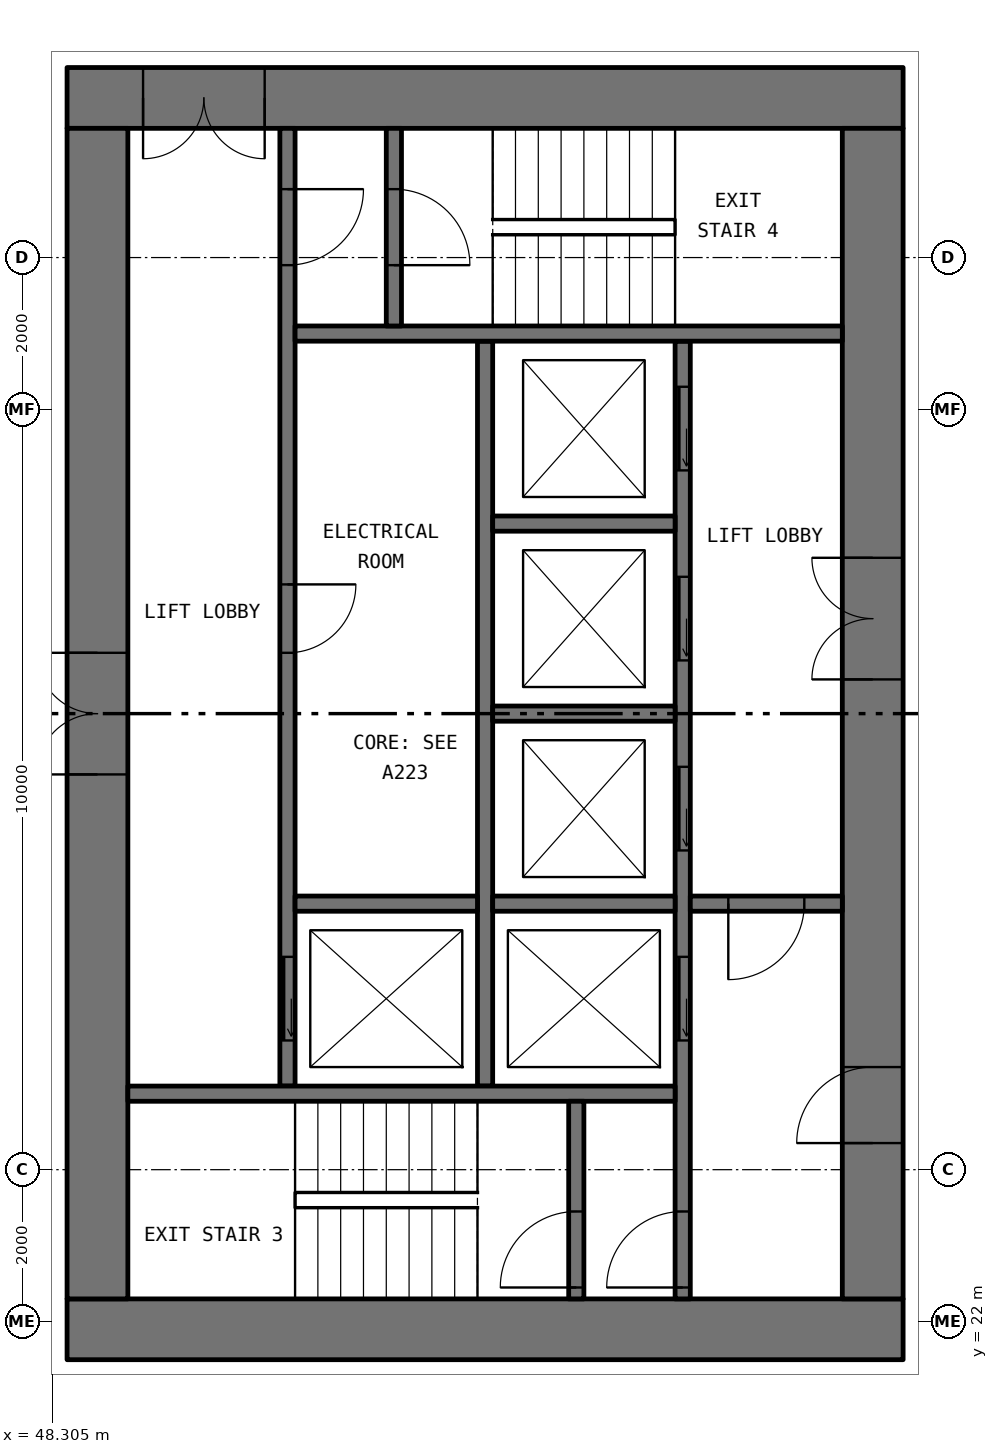
"""IFC4 building model, lengths in metres.
Left out: names, types, materials, properties, quantities, classifications, styles, units other than length and angle.
Written with IfcOpenShell. Run it as: python <this file> out.ifc"""

import sys

from ifc_helpers import new_model, si_unit, direction, frame, frame_2d, origin, place, context, subcontext, project, spatial, rectangle, extrude, element, fill, save


model = new_model("IFC4")
c1 = context("Model", 3, precision=1e-05, world=origin(), true_north=direction((0.0, 1.0)))
c2 = subcontext(c1, "Body", "Model", "MODEL_VIEW")
j1 = project(units=[si_unit("LENGTHUNIT", "METRE"), si_unit("PLANEANGLEUNIT", "RADIAN")], contexts=[c1])
p1 = place(None, origin())
s1 = spatial("IfcSite", under=j1, at=p1, CompositionType="ELEMENT")
p2 = place(p1, origin())
s2 = spatial("IfcBuilding", under=s1, at=p2, CompositionType="ELEMENT")
p3 = place(p2, frame((0.0, 0.0, 88.65)))
s3 = spatial("IfcBuildingStorey", under=s2, at=p3, CompositionType="ELEMENT", Elevation=88.65)
p4 = place(p3, frame((59.5, 21.9, 0.0), z_axis=(0.0, 0.0, 1.0), x_axis=(-1.0, 0.0, 0.0)))
e1 = element("IfcWall", 1, at=p4, inside=s3, PredefinedType="SHEAR", context=c2, shape_type="SweptSolid", body=[
    extrude(rectangle(XDim=11.0, YDim=0.8, at=frame_2d((5.5, 0.0))), origin(), (0.0, 0.0, 1.0), 3.05),
])
p5 = place(p3, frame((59.5, 38.1, 0.0), z_axis=(0.0, 0.0, 1.0), x_axis=(-1.0, 0.0, 0.0)))
e2 = element("IfcWall", 2, at=p5, inside=s3, PredefinedType="SHEAR", context=c2, shape_type="SweptSolid", body=[
    extrude(rectangle(XDim=11.0, YDim=0.8, at=frame_2d((5.5, 0.0))), origin(), (0.0, 0.0, 1.0), 3.05),
])
p6 = place(p5, frame((8.4, 0.0, 0.0)))
e3 = element("IfcOpeningElement", 3, at=p6, cuts=e2, PredefinedType="OPENING", context=c2, shape_type="SweptSolid", body=[
    extrude(rectangle(XDim=1.6, YDim=2.1, at=frame_2d((0.8, 1.05))), frame((0.0, 0.41, 0.0), z_axis=(0.0, -1.0, 0.0), x_axis=(1.0, 0.0, 0.0)), (0.0, 0.0, 1.0), 0.82),
])
p7 = place(p3, frame((59.1, 22.3, 0.0), z_axis=(0.0, 0.0, 1.0), x_axis=(0.0, 1.0, 0.0)))
e4 = element("IfcWall", 4, at=p7, inside=s3, PredefinedType="SHEAR", context=c2, shape_type="SweptSolid", body=[
    extrude(rectangle(XDim=15.4, YDim=0.8, at=frame_2d((7.7, 0.0))), origin(), (0.0, 0.0, 1.0), 3.05),
])
p8 = place(p7, frame((8.15, 0.0, 0.0)))
e5 = element("IfcOpeningElement", 5, at=p8, cuts=e4, PredefinedType="OPENING", context=c2, shape_type="SweptSolid", body=[
    extrude(rectangle(XDim=1.6, YDim=2.1, at=frame_2d((0.8, 1.05))), frame((0.0, 0.41, 0.0), z_axis=(0.0, -1.0, 0.0), x_axis=(1.0, 0.0, 0.0)), (0.0, 0.0, 1.0), 0.82),
])
p9 = place(p7, frame((2.05, 0.0, 0.0)))
e6 = element("IfcOpeningElement", 6, at=p9, cuts=e4, PredefinedType="OPENING", context=c2, shape_type="SweptSolid", body=[
    extrude(rectangle(XDim=1.0, YDim=2.1, at=frame_2d((0.5, 1.05))), frame((0.0, 0.41, 0.0), z_axis=(0.0, -1.0, 0.0), x_axis=(1.0, 0.0, 0.0)), (0.0, 0.0, 1.0), 0.82),
])
p10 = place(p3, frame((48.9, 22.3, 0.0), z_axis=(0.0, 0.0, 1.0), x_axis=(0.0, 1.0, 0.0)))
e7 = element("IfcWall", 7, at=p10, inside=s3, PredefinedType="SHEAR", context=c2, shape_type="SweptSolid", body=[
    extrude(rectangle(XDim=15.4, YDim=0.8, at=frame_2d((7.7, 0.0))), origin(), (0.0, 0.0, 1.0), 3.05),
])
p11 = place(p10, frame((6.9, 0.0, 0.0)))
e8 = element("IfcOpeningElement", 8, at=p11, cuts=e7, PredefinedType="OPENING", context=c2, shape_type="SweptSolid", body=[
    extrude(rectangle(XDim=1.6, YDim=2.1, at=frame_2d((0.8, 1.05))), frame((0.0, 0.41, 0.0), z_axis=(0.0, -1.0, 0.0), x_axis=(1.0, 0.0, 0.0)), (0.0, 0.0, 1.0), 0.82),
])
p12 = place(p3, frame((56.6, 22.3, 0.0), z_axis=(0.0, 0.0, 1.0), x_axis=(0.0, 1.0, 0.0)))
e9 = element("IfcWall", 9, at=p12, inside=s3, PredefinedType="SOLIDWALL", context=c2, shape_type="SweptSolid", body=[
    extrude(rectangle(XDim=12.6, YDim=0.2, at=frame_2d((6.3, 0.0))), origin(), (0.0, 0.0, 1.0), 3.05),
])
p13 = place(p12, frame((3.4, 0.0, 0.0)))
e10 = element("IfcOpeningElement", 10, at=p13, cuts=e9, PredefinedType="OPENING", context=c2, shape_type="SweptSolid", body=[
    extrude(rectangle(XDim=1.1, YDim=2.1, at=frame_2d((0.55, 1.05))), frame((0.0, 0.11, 0.0), z_axis=(0.0, -1.0, 0.0), x_axis=(1.0, 0.0, 0.0)), (0.0, 0.0, 1.0), 0.22),
])
p14 = place(p12, frame((5.9, 0.0, 0.0)))
e11 = element("IfcOpeningElement", 11, at=p14, cuts=e9, PredefinedType="OPENING", context=c2, shape_type="SweptSolid", body=[
    extrude(rectangle(XDim=1.1, YDim=2.1, at=frame_2d((0.55, 1.05))), frame((0.0, 0.11, 0.0), z_axis=(0.0, -1.0, 0.0), x_axis=(1.0, 0.0, 0.0)), (0.0, 0.0, 1.0), 0.22),
])
p15 = place(p12, frame((8.4, 0.0, 0.0)))
e12 = element("IfcOpeningElement", 12, at=p15, cuts=e9, PredefinedType="OPENING", context=c2, shape_type="SweptSolid", body=[
    extrude(rectangle(XDim=1.1, YDim=2.1, at=frame_2d((0.55, 1.05))), frame((0.0, 0.11, 0.0), z_axis=(0.0, -1.0, 0.0), x_axis=(1.0, 0.0, 0.0)), (0.0, 0.0, 1.0), 0.22),
])
p16 = place(p12, frame((10.9, 0.0, 0.0)))
e13 = element("IfcOpeningElement", 13, at=p16, cuts=e9, PredefinedType="OPENING", context=c2, shape_type="SweptSolid", body=[
    extrude(rectangle(XDim=1.1, YDim=2.1, at=frame_2d((0.55, 1.05))), frame((0.0, 0.11, 0.0), z_axis=(0.0, -1.0, 0.0), x_axis=(1.0, 0.0, 0.0)), (0.0, 0.0, 1.0), 0.22),
])
p17 = place(p12, frame((0.15, 0.0, 0.0)))
e14 = element("IfcOpeningElement", 14, at=p17, cuts=e9, PredefinedType="OPENING", context=c2, shape_type="SweptSolid", body=[
    extrude(rectangle(XDim=1.0, YDim=2.1, at=frame_2d((0.5, 1.05))), frame((0.0, 0.11, 0.0), z_axis=(0.0, -1.0, 0.0), x_axis=(1.0, 0.0, 0.0)), (0.0, 0.0, 1.0), 0.22),
])
p18 = place(p3, frame((51.4, 25.1, 0.0), z_axis=(0.0, 0.0, 1.0), x_axis=(0.0, 1.0, 0.0)))
e15 = element("IfcWall", 15, at=p18, inside=s3, PredefinedType="SOLIDWALL", context=c2, shape_type="SweptSolid", body=[
    extrude(rectangle(XDim=12.6, YDim=0.2, at=frame_2d((6.3, 0.0))), origin(), (0.0, 0.0, 1.0), 3.05),
])
p19 = place(p18, frame((0.6, 0.0, 0.0)))
e16 = element("IfcOpeningElement", 16, at=p19, cuts=e15, PredefinedType="OPENING", context=c2, shape_type="SweptSolid", body=[
    extrude(rectangle(XDim=1.1, YDim=2.1, at=frame_2d((0.55, 1.05))), frame((0.0, 0.11, 0.0), z_axis=(0.0, -1.0, 0.0), x_axis=(1.0, 0.0, 0.0)), (0.0, 0.0, 1.0), 0.22),
])
p20 = place(p18, frame((10.8, 0.0, 0.0)))
e17 = element("IfcOpeningElement", 17, at=p20, cuts=e15, PredefinedType="OPENING", context=c2, shape_type="SweptSolid", body=[
    extrude(rectangle(XDim=1.0, YDim=2.1, at=frame_2d((0.5, 1.05))), frame((0.0, 0.11, 0.0), z_axis=(0.0, -1.0, 0.0), x_axis=(1.0, 0.0, 0.0)), (0.0, 0.0, 1.0), 0.22),
])
p21 = place(p18, frame((5.7, 0.0, 0.0)))
e18 = element("IfcOpeningElement", 18, at=p21, cuts=e15, PredefinedType="OPENING", context=c2, shape_type="SweptSolid", body=[
    extrude(rectangle(XDim=0.9, YDim=2.1, at=frame_2d((0.45, 1.05))), frame((0.0, 0.11, 0.0), z_axis=(0.0, -1.0, 0.0), x_axis=(1.0, 0.0, 0.0)), (0.0, 0.0, 1.0), 0.22),
])
p22 = place(p3, frame((54.0, 25.1, 0.0), z_axis=(0.0, 0.0, 1.0), x_axis=(0.0, 1.0, 0.0)))
e19 = element("IfcWall", 19, at=p22, inside=s3, PredefinedType="SOLIDWALL", context=c2, shape_type="SweptSolid", body=[
    extrude(rectangle(XDim=9.8, YDim=0.2, at=frame_2d((4.9, 0.0))), origin(), (0.0, 0.0, 1.0), 3.05),
])
for number, where, z_axis, x_axis in (
    (20, (56.5, 25.0, 0.0), (0.0, 0.0, 1.0), (-1.0, 0.0, 0.0)),
    (21, (58.7, 35.0, 0.0), (0.0, 0.0, 1.0), (-1.0, 0.0, 0.0)),
):
    element("IfcWall", number, at=place(p3, frame(where, z_axis=z_axis, x_axis=x_axis)), inside=s3, PredefinedType="SOLIDWALL", context=c2, shape_type="SweptSolid", body=[
        extrude(rectangle(XDim=7.2, YDim=0.2, at=frame_2d((3.6, 0.0))), origin(), (0.0, 0.0, 1.0), 3.05),
    ])
p23 = place(p3, frame((58.7, 27.5, 0.0), z_axis=(0.0, 0.0, 1.0), x_axis=(-1.0, 0.0, 0.0)))
e22 = element("IfcWall", 22, at=p23, inside=s3, PredefinedType="SOLIDWALL", context=c2, shape_type="SweptSolid", body=[
    extrude(rectangle(XDim=2.0, YDim=0.2, at=frame_2d((1.0, 0.0))), origin(), (0.0, 0.0, 1.0), 3.05),
])
p24 = place(p23, frame((0.5, 0.0, 0.0)))
e23 = element("IfcOpeningElement", 23, at=p24, cuts=e22, PredefinedType="OPENING", context=c2, shape_type="SweptSolid", body=[
    extrude(rectangle(XDim=1.0, YDim=2.1, at=frame_2d((0.5, 1.05))), frame((0.0, 0.11, 0.0), z_axis=(0.0, -1.0, 0.0), x_axis=(1.0, 0.0, 0.0)), (0.0, 0.0, 1.0), 0.22),
])
p25 = place(p3, frame((55.2, 22.3, 0.0), z_axis=(0.0, 0.0, 1.0), x_axis=(0.0, 1.0, 0.0)))
e24 = element("IfcWall", 24, at=p25, inside=s3, PredefinedType="SOLIDWALL", context=c2, shape_type="SweptSolid", body=[
    extrude(rectangle(XDim=2.6, YDim=0.2, at=frame_2d((1.3, 0.0))), origin(), (0.0, 0.0, 1.0), 3.05),
])
p26 = place(p25, frame((0.15, 0.0, 0.0)))
e25 = element("IfcOpeningElement", 25, at=p26, cuts=e24, PredefinedType="OPENING", context=c2, shape_type="SweptSolid", body=[
    extrude(rectangle(XDim=1.0, YDim=2.1, at=frame_2d((0.5, 1.05))), frame((0.0, 0.11, 0.0), z_axis=(0.0, -1.0, 0.0), x_axis=(1.0, 0.0, 0.0)), (0.0, 0.0, 1.0), 0.22),
])
p27 = place(p3, frame((52.8, 35.1, 0.0), z_axis=(0.0, 0.0, 1.0), x_axis=(0.0, 1.0, 0.0)))
e26 = element("IfcWall", 26, at=p27, inside=s3, PredefinedType="SOLIDWALL", context=c2, shape_type="SweptSolid", body=[
    extrude(rectangle(XDim=2.6, YDim=0.2, at=frame_2d((1.3, 0.0))), origin(), (0.0, 0.0, 1.0), 3.05),
])
p28 = place(p27, frame((0.8, 0.0, 0.0)))
e27 = element("IfcOpeningElement", 27, at=p28, cuts=e26, PredefinedType="OPENING", context=c2, shape_type="SweptSolid", body=[
    extrude(rectangle(XDim=1.0, YDim=2.1, at=frame_2d((0.5, 1.05))), frame((0.0, 0.11, 0.0), z_axis=(0.0, -1.0, 0.0), x_axis=(1.0, 0.0, 0.0)), (0.0, 0.0, 1.0), 0.22),
])
for number, where, z_axis, x_axis in (
    (28, (56.5, 27.5, 0.0), (0.0, 0.0, 1.0), (-1.0, 0.0, 0.0)),
    (29, (56.5, 30.0, 0.0), (0.0, 0.0, 1.0), (-1.0, 0.0, 0.0)),
    (30, (56.5, 32.5, 0.0), (0.0, 0.0, 1.0), (-1.0, 0.0, 0.0)),
    (31, (53.9, 27.5, 0.0), (0.0, 0.0, 1.0), (-1.0, 0.0, 0.0)),
):
    element("IfcWall", number, at=place(p3, frame(where, z_axis=z_axis, x_axis=x_axis)), inside=s3, PredefinedType="SOLIDWALL", context=c2, shape_type="SweptSolid", body=[
        extrude(rectangle(XDim=2.4, YDim=0.2, at=frame_2d((1.2, 0.0))), origin(), (0.0, 0.0, 1.0), 3.05),
    ])
p29 = place(p19, origin())
e32 = element("IfcDoor", 32, at=p29, inside=s3, OperationType="SLIDING_TO_LEFT", PredefinedType="DOOR", context=c2, shape_type="SweptSolid", body=[
    extrude(rectangle(XDim=1.1, YDim=2.1, at=frame_2d((0.55, 1.05))), frame((0.0, 0.025, 0.0), z_axis=(0.0, -1.0, 0.0), x_axis=(1.0, 0.0, 0.0)), (0.0, 0.0, 1.0), 0.05),
])
fill(e16, e32)
p30 = place(p13, origin())
e33 = element("IfcDoor", 33, at=p30, inside=s3, OperationType="SLIDING_TO_LEFT", PredefinedType="DOOR", context=c2, shape_type="SweptSolid", body=[
    extrude(rectangle(XDim=1.1, YDim=2.1, at=frame_2d((0.55, 1.05))), frame((0.0, 0.025, 0.0), z_axis=(0.0, -1.0, 0.0), x_axis=(1.0, 0.0, 0.0)), (0.0, 0.0, 1.0), 0.05),
])
fill(e10, e33)
p31 = place(p14, origin())
e34 = element("IfcDoor", 34, at=p31, inside=s3, OperationType="SLIDING_TO_LEFT", PredefinedType="DOOR", context=c2, shape_type="SweptSolid", body=[
    extrude(rectangle(XDim=1.1, YDim=2.1, at=frame_2d((0.55, 1.05))), frame((0.0, 0.025, 0.0), z_axis=(0.0, -1.0, 0.0), x_axis=(1.0, 0.0, 0.0)), (0.0, 0.0, 1.0), 0.05),
])
fill(e11, e34)
p32 = place(p15, origin())
e35 = element("IfcDoor", 35, at=p32, inside=s3, OperationType="SLIDING_TO_LEFT", PredefinedType="DOOR", context=c2, shape_type="SweptSolid", body=[
    extrude(rectangle(XDim=1.1, YDim=2.1, at=frame_2d((0.55, 1.05))), frame((0.0, 0.025, 0.0), z_axis=(0.0, -1.0, 0.0), x_axis=(1.0, 0.0, 0.0)), (0.0, 0.0, 1.0), 0.05),
])
fill(e12, e35)
p33 = place(p16, origin())
e36 = element("IfcDoor", 36, at=p33, inside=s3, OperationType="SLIDING_TO_LEFT", PredefinedType="DOOR", context=c2, shape_type="SweptSolid", body=[
    extrude(rectangle(XDim=1.1, YDim=2.1, at=frame_2d((0.55, 1.05))), frame((0.0, 0.025, 0.0), z_axis=(0.0, -1.0, 0.0), x_axis=(1.0, 0.0, 0.0)), (0.0, 0.0, 1.0), 0.05),
])
fill(e13, e36)
p34 = place(p26, origin())
e37 = element("IfcDoor", 37, at=p34, inside=s3, OperationType="SINGLE_SWING_RIGHT", PredefinedType="DOOR", context=c2, shape_type="SweptSolid", body=[
    extrude(rectangle(XDim=1.0, YDim=2.1, at=frame_2d((0.5, 1.05))), frame((0.0, 0.025, 0.0), z_axis=(0.0, -1.0, 0.0), x_axis=(1.0, 0.0, 0.0)), (0.0, 0.0, 1.0), 0.05),
])
fill(e25, e37)
p35 = place(p17, origin())
e38 = element("IfcDoor", 38, at=p35, inside=s3, OperationType="SINGLE_SWING_RIGHT", PredefinedType="DOOR", context=c2, shape_type="SweptSolid", body=[
    extrude(rectangle(XDim=1.0, YDim=2.1, at=frame_2d((0.5, 1.05))), frame((0.0, 0.025, 0.0), z_axis=(0.0, -1.0, 0.0), x_axis=(1.0, 0.0, 0.0)), (0.0, 0.0, 1.0), 0.05),
])
fill(e14, e38)
p36 = place(p20, frame((1.0, 0.0, 0.0), x_axis=(-1.0, 0.0, 0.0)))
e39 = element("IfcDoor", 39, at=p36, inside=s3, OperationType="SINGLE_SWING_RIGHT", PredefinedType="DOOR", context=c2, shape_type="SweptSolid", body=[
    extrude(rectangle(XDim=1.0, YDim=2.1, at=frame_2d((0.5, 1.05))), frame((0.0, 0.025, 0.0), z_axis=(0.0, -1.0, 0.0), x_axis=(1.0, 0.0, 0.0)), (0.0, 0.0, 1.0), 0.05),
])
fill(e17, e39)
p37 = place(p28, frame((1.0, 0.0, 0.0), x_axis=(-1.0, 0.0, 0.0)))
e40 = element("IfcDoor", 40, at=p37, inside=s3, OperationType="SINGLE_SWING_LEFT", PredefinedType="DOOR", context=c2, shape_type="SweptSolid", body=[
    extrude(rectangle(XDim=1.0, YDim=2.1, at=frame_2d((0.5, 1.05))), frame((0.0, 0.025, 0.0), z_axis=(0.0, -1.0, 0.0), x_axis=(1.0, 0.0, 0.0)), (0.0, 0.0, 1.0), 0.05),
])
fill(e27, e40)
p38 = place(p24, origin())
e41 = element("IfcDoor", 41, at=p38, inside=s3, OperationType="SINGLE_SWING_LEFT", PredefinedType="DOOR", context=c2, shape_type="SweptSolid", body=[
    extrude(rectangle(XDim=1.0, YDim=2.1, at=frame_2d((0.5, 1.05))), frame((0.0, 0.025, 0.0), z_axis=(0.0, -1.0, 0.0), x_axis=(1.0, 0.0, 0.0)), (0.0, 0.0, 1.0), 0.05),
])
fill(e23, e41)
p39 = place(p8, origin())
e42 = element("IfcDoor", 42, at=p39, inside=s3, OperationType="DOUBLE_DOOR_SINGLE_SWING", PredefinedType="DOOR", context=c2, shape_type="SweptSolid", body=[
    extrude(rectangle(XDim=1.6, YDim=2.1, at=frame_2d((0.8, 1.05))), frame((0.0, 0.025, 0.0), z_axis=(0.0, -1.0, 0.0), x_axis=(1.0, 0.0, 0.0)), (0.0, 0.0, 1.0), 0.05),
])
fill(e5, e42)
p40 = place(p9, origin())
e43 = element("IfcDoor", 43, at=p40, inside=s3, OperationType="SINGLE_SWING_RIGHT", PredefinedType="DOOR", context=c2, shape_type="SweptSolid", body=[
    extrude(rectangle(XDim=1.0, YDim=2.1, at=frame_2d((0.5, 1.05))), frame((0.0, 0.025, 0.0), z_axis=(0.0, -1.0, 0.0), x_axis=(1.0, 0.0, 0.0)), (0.0, 0.0, 1.0), 0.05),
])
fill(e6, e43)
p41 = place(p6, origin())
e44 = element("IfcDoor", 44, at=p41, inside=s3, OperationType="DOUBLE_DOOR_SINGLE_SWING", PredefinedType="DOOR", context=c2, shape_type="SweptSolid", body=[
    extrude(rectangle(XDim=1.6, YDim=2.1, at=frame_2d((0.8, 1.05))), frame((0.0, 0.025, 0.0), z_axis=(0.0, -1.0, 0.0), x_axis=(1.0, 0.0, 0.0)), (0.0, 0.0, 1.0), 0.05),
])
fill(e3, e44)
p42 = place(p11, origin())
e45 = element("IfcDoor", 45, at=p42, inside=s3, OperationType="DOUBLE_DOOR_SINGLE_SWING", PredefinedType="DOOR", context=c2, shape_type="SweptSolid", body=[
    extrude(rectangle(XDim=1.6, YDim=2.1, at=frame_2d((0.8, 1.05))), frame((0.0, 0.025, 0.0), z_axis=(0.0, -1.0, 0.0), x_axis=(1.0, 0.0, 0.0)), (0.0, 0.0, 1.0), 0.05),
])
fill(e8, e45)
p43 = place(p21, frame((0.9, 0.0, 0.0), x_axis=(-1.0, 0.0, 0.0)))
e46 = element("IfcDoor", 46, at=p43, inside=s3, OperationType="SINGLE_SWING_RIGHT", PredefinedType="DOOR", context=c2, shape_type="SweptSolid", body=[
    extrude(rectangle(XDim=0.9, YDim=2.1, at=frame_2d((0.45, 1.05))), frame((0.0, 0.025, 0.0), z_axis=(0.0, -1.0, 0.0), x_axis=(1.0, 0.0, 0.0)), (0.0, 0.0, 1.0), 0.05),
])
fill(e18, e46)
save(model, sys.argv[1])
